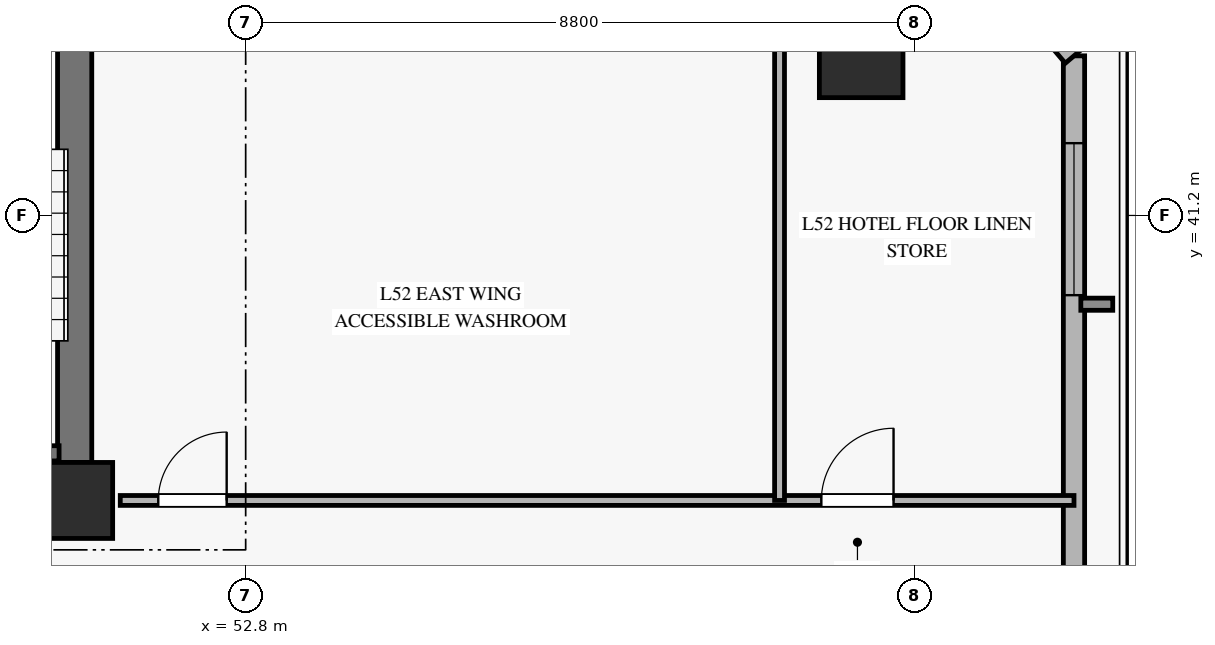
"""IFC4 building model, lengths in metres.
Left out: names, types, materials, properties, quantities, classifications, styles, units other than length and angle.
Written with IfcOpenShell. Run it as: python <this file> out.ifc"""

import sys

from ifc_helpers import new_model, si_unit, direction, frame, frame_2d, origin, origin_2d, place, context, subcontext, project, spatial, rectangle, hollow_rectangle, extrude, source, transform, mapped, element, fill, save


model = new_model("IFC4")
c1 = context("Model", 3, precision=1e-05, world=origin(), true_north=direction((0.0, 1.0)))
c2 = subcontext(c1, "Body", "Model", "MODEL_VIEW")
j1 = project(units=[si_unit("LENGTHUNIT", "METRE"), si_unit("PLANEANGLEUNIT", "RADIAN")], contexts=[c1])
p1 = place(None, origin())
s1 = spatial("IfcSite", under=j1, at=p1, CompositionType="ELEMENT")
p2 = place(p1, origin())
s2 = spatial("IfcBuilding", under=s1, at=p2, CompositionType="ELEMENT")
p3 = place(p2, frame((0.0, 0.0, 206.2)))
s3 = spatial("IfcBuildingStorey", under=s2, at=p3, CompositionType="ELEMENT", Elevation=206.2)
m1 = source(origin(), c2, "Body", "SweptSolid", [
    extrude(rectangle(XDim=1.0, YDim=1.0, at=origin_2d()), origin(), (0.0, 0.0, 1.0), 3.27),
])
p4 = place(p3, frame((50.55, 37.45, 0.0), z_axis=(0.0, 0.0, 1.0), x_axis=(1.0, 0.0, 0.0)))
e1 = element("IfcColumn", 1, at=p4, inside=s3, PredefinedType="PILASTER", context=c2, shape_type="MappedRepresentation", body=[
    mapped(m1, transform((0.0, 0.0, 0.0), x_axis=(1.0, 0.0, 0.0), y_axis=(0.0, 1.0, 0.0), z_axis=(0.0, 0.0, 1.0), scale=1.0)),
])
p5 = place(p3, frame((50.55, 37.95, 0.0), z_axis=(0.0, 0.0, 1.0), x_axis=(0.0, 1.0, 0.0)))
e2 = element("IfcWall", 2, at=p5, inside=s3, PredefinedType="SHEAR", context=c2, shape_type="SweptSolid", body=[
    extrude(rectangle(XDim=8.1, YDim=0.45, at=frame_2d((4.05, 0.0))), origin(), (0.0, 0.0, 1.0), 3.27),
])
m2 = source(origin(), c2, "Body", "SweptSolid", [
    extrude(hollow_rectangle(XDim=1.1, YDim=1.1, WallThickness=0.05, at=origin_2d()), origin(), (0.0, 0.0, 1.0), 3.27),
])
p6 = place(p3, frame((60.898, 43.3, 0.0), z_axis=(0.0, 0.0, 1.0), x_axis=(1.0, 0.0, 0.0)))
e3 = element("IfcColumn", 3, at=p6, inside=s3, PredefinedType="COLUMN", context=c2, shape_type="MappedRepresentation", body=[
    mapped(m2, transform((0.0, 0.0, 0.0), x_axis=(1.0, 0.0, 0.0), y_axis=(0.0, 1.0, 0.0), z_axis=(0.0, 0.0, 1.0), scale=1.0)),
])
p7 = place(p3, frame((63.698, 29.043, 0.0), z_axis=(0.0, 0.0, 1.0), x_axis=(0.0, 1.0, 0.0)))
e4 = element("IfcWall", 4, at=p7, inside=s3, PredefinedType="SOLIDWALL", context=c2, shape_type="SweptSolid", body=[
    extrude(rectangle(XDim=14.257, YDim=0.28, at=frame_2d((7.128, 0.0))), origin(), (0.0, 0.0, 1.0), 2.75),
])
p8 = place(p7, frame((1.232, 0.0, 0.45)))
e5 = element("IfcOpeningElement", 5, at=p8, cuts=e4, PredefinedType="OPENING", context=c2, shape_type="SweptSolid", body=[
    extrude(rectangle(XDim=2.0, YDim=2.0, at=frame_2d((1.0, 1.0))), frame((0.0, 0.15, 0.0), z_axis=(0.0, -1.0, 0.0), x_axis=(1.0, 0.0, 0.0)), (0.0, 0.0, 1.0), 0.3),
])
p9 = place(p7, frame((11.108, 0.0, 0.45)))
e6 = element("IfcOpeningElement", 6, at=p9, cuts=e4, PredefinedType="OPENING", context=c2, shape_type="SweptSolid", body=[
    extrude(rectangle(XDim=2.0, YDim=2.0, at=frame_2d((1.0, 1.0))), frame((0.0, 0.15, 0.0), z_axis=(0.0, -1.0, 0.0), x_axis=(1.0, 0.0, 0.0)), (0.0, 0.0, 1.0), 0.3),
])
p10 = place(p3, frame((63.698, 43.3, 0.0), z_axis=(0.0, 0.0, 1.0), x_axis=(-0.646527923623, 0.762890322377, 0.0)))
e7 = element("IfcWall", 7, at=p10, inside=s3, PredefinedType="SOLIDWALL", context=c2, shape_type="SweptSolid", body=[
    extrude(rectangle(XDim=3.867, YDim=0.3, at=frame_2d((1.933, 0.0))), origin(), (0.0, 0.0, 1.0), 2.75),
])
p11 = place(p10, frame((1.133, 0.0, 0.45)))
e8 = element("IfcOpeningElement", 8, at=p11, cuts=e7, PredefinedType="OPENING", context=c2, shape_type="SweptSolid", body=[
    extrude(rectangle(XDim=1.6, YDim=2.0, at=frame_2d((0.8, 1.0))), frame((0.0, 0.16, 0.0), z_axis=(0.0, -1.0, 0.0), x_axis=(1.0, 0.0, 0.0)), (0.0, 0.0, 1.0), 0.32),
])
p12 = place(p3, frame((47.44, 38.07, 0.0), z_axis=(0.0, 0.0, 1.0), x_axis=(1.0, 0.0, 0.0)))
e9 = element("IfcWall", 9, at=p12, inside=s3, PredefinedType="SOLIDWALL", context=c2, shape_type="SweptSolid", body=[
    extrude(rectangle(XDim=2.905, YDim=0.2, at=frame_2d((1.453, 0.0))), origin(), (0.0, 0.0, 1.0), 3.5),
])
p13 = place(p3, frame((51.15, 37.45, 0.0), z_axis=(0.0, 0.0, 1.0), x_axis=(1.0, 0.0, 0.0)))
e10 = element("IfcWall", 10, at=p13, inside=s3, PredefinedType="PARTITIONING", context=c2, shape_type="SweptSolid", body=[
    extrude(rectangle(XDim=12.548, YDim=0.13, at=frame_2d((6.274, 0.0))), origin(), (0.0, 0.0, 1.0), 2.755),
])
p14 = place(p13, frame((0.5, 0.0, 0.0)))
e11 = element("IfcOpeningElement", 11, at=p14, cuts=e10, PredefinedType="OPENING", context=c2, shape_type="SweptSolid", body=[
    extrude(rectangle(XDim=0.9, YDim=2.1, at=frame_2d((0.45, 1.05))), frame((0.0, 0.075, 0.0), z_axis=(0.0, -1.0, 0.0), x_axis=(1.0, 0.0, 0.0)), (0.0, 0.0, 1.0), 0.15),
])
p15 = place(p13, frame((9.224, 0.0, 0.0)))
e12 = element("IfcOpeningElement", 12, at=p15, cuts=e10, PredefinedType="OPENING", context=c2, shape_type="SweptSolid", body=[
    extrude(rectangle(XDim=0.95, YDim=2.1, at=frame_2d((0.475, 1.05))), frame((0.0, 0.075, 0.0), z_axis=(0.0, -1.0, 0.0), x_axis=(1.0, 0.0, 0.0)), (0.0, 0.0, 1.0), 0.15),
])
p16 = place(p3, frame((59.824, 37.45, 0.0), z_axis=(0.0, 0.0, 1.0), x_axis=(0.0, 1.0, 0.0)))
e13 = element("IfcWall", 13, at=p16, inside=s3, PredefinedType="PARTITIONING", context=c2, shape_type="SweptSolid", body=[
    extrude(rectangle(XDim=8.8, YDim=0.13, at=frame_2d((4.4, 0.0))), origin(), (0.0, 0.0, 1.0), 2.755),
])
m3 = source(origin(), c2, "Body", "SweptSolid", [
    extrude(rectangle(XDim=2.0, YDim=2.0, at=frame_2d((1.0, 1.0))), frame((0.0, 0.03, 0.0), z_axis=(0.0, -1.0, 0.0), x_axis=(1.0, 0.0, 0.0)), (0.0, 0.0, 1.0), 0.06),
])
p17 = place(p9, origin())
e14 = element("IfcWindow", 14, at=p17, inside=s3, PartitioningType="SINGLE_PANEL", PredefinedType="WINDOW", context=c2, shape_type="MappedRepresentation", body=[
    mapped(m3, transform((0.0, 0.0, 0.0), x_axis=(1.0, 0.0, 0.0), y_axis=(0.0, 1.0, 0.0), z_axis=(0.0, 0.0, 1.0), scale=1.0)),
])
fill(e6, e14)
m4 = source(origin(), c2, "Body", "SweptSolid", [
    extrude(rectangle(XDim=0.9, YDim=2.1, at=frame_2d((0.45, 1.05))), frame((0.0, 0.025, 0.0), z_axis=(0.0, -1.0, 0.0), x_axis=(1.0, 0.0, 0.0)), (0.0, 0.0, 1.0), 0.05),
])
p18 = place(p14, origin())
e15 = element("IfcDoor", 15, at=p18, inside=s3, OperationType="SINGLE_SWING_RIGHT", PredefinedType="DOOR", context=c2, shape_type="MappedRepresentation", body=[
    mapped(m4, transform((0.0, 0.0, 0.0), x_axis=(1.0, 0.0, 0.0), y_axis=(0.0, 1.0, 0.0), z_axis=(0.0, 0.0, 1.0), scale=1.0)),
])
fill(e11, e15)
m5 = source(origin(), c2, "Body", "SweptSolid", [
    extrude(rectangle(XDim=0.95, YDim=2.1, at=frame_2d((0.475, 1.05))), frame((0.0, 0.025, 0.0), z_axis=(0.0, -1.0, 0.0), x_axis=(1.0, 0.0, 0.0)), (0.0, 0.0, 1.0), 0.05),
])
p19 = place(p15, origin())
e16 = element("IfcDoor", 16, at=p19, inside=s3, OperationType="SINGLE_SWING_RIGHT", PredefinedType="DOOR", context=c2, shape_type="MappedRepresentation", body=[
    mapped(m5, transform((0.0, 0.0, 0.0), x_axis=(1.0, 0.0, 0.0), y_axis=(0.0, 1.0, 0.0), z_axis=(0.0, 0.0, 1.0), scale=1.0)),
])
fill(e12, e16)
save(model, sys.argv[1])
